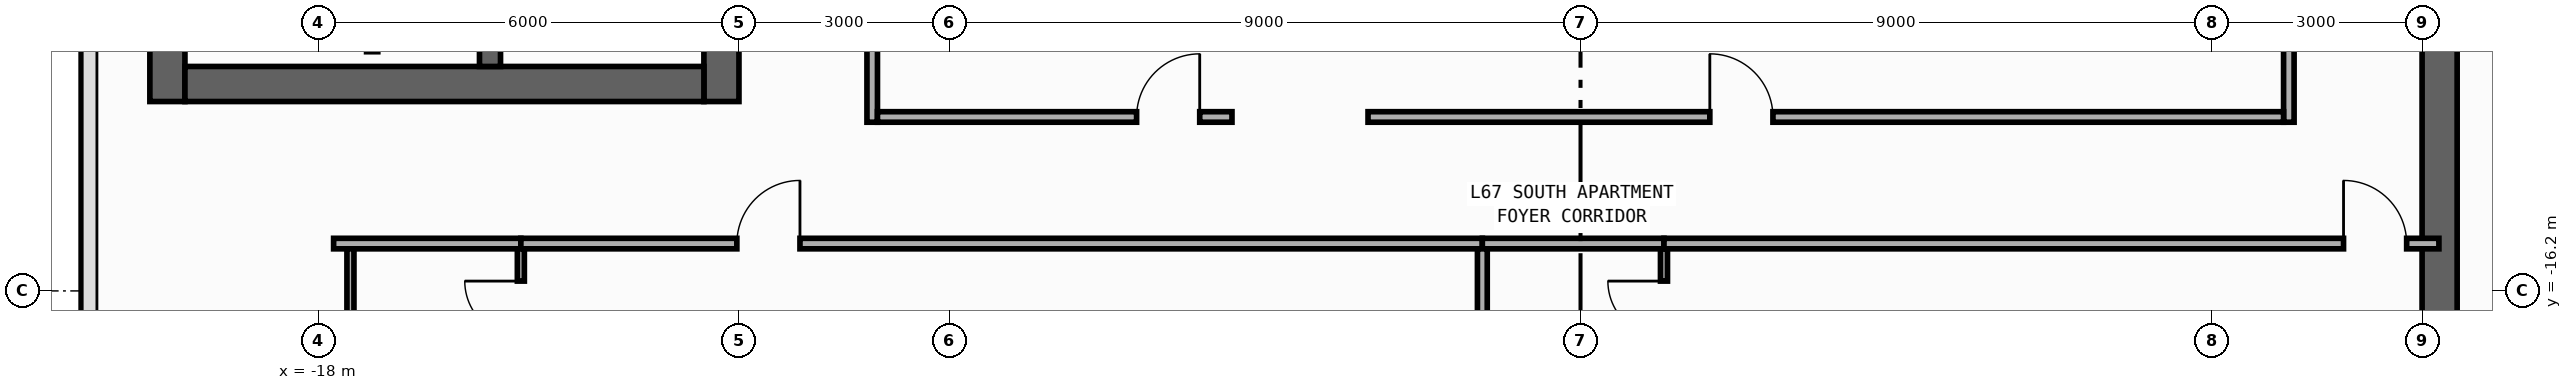
"""IFC4 building model, lengths in metres.
Left out: names, types, materials, properties, quantities, classifications, styles, units other than length and angle.
Written with IfcOpenShell. Run it as: python <this file> out.ifc"""

import sys

from ifc_helpers import new_model, si_unit, direction, frame, frame_2d, origin, place, context, subcontext, project, spatial, rectangle, extrude, element, fill, save


model = new_model("IFC4")
c1 = context("Model", 3, precision=1e-05, world=origin(), true_north=direction((0.0, 1.0)))
c2 = subcontext(c1, "Body", "Model", "MODEL_VIEW")
j1 = project(units=[si_unit("LENGTHUNIT", "METRE"), si_unit("PLANEANGLEUNIT", "RADIAN")], contexts=[c1])
p1 = place(None, origin())
s1 = spatial("IfcSite", under=j1, at=p1, CompositionType="ELEMENT")
p2 = place(p1, origin())
s2 = spatial("IfcBuilding", under=s1, at=p2, CompositionType="ELEMENT")
p3 = place(p2, frame((0.0, 0.0, 281.4)))
s3 = spatial("IfcBuildingStorey", under=s2, at=p3, CompositionType="ELEMENT", Elevation=281.4)
p4 = place(p3, frame((-20.15, -13.5, 0.0), z_axis=(0.0, 0.0, 1.0), x_axis=(0.0, 1.0, 0.0)))
e1 = element("IfcWall", 1, at=p4, inside=s3, PredefinedType="SHEAR", context=c2, shape_type="SweptSolid", body=[
    extrude(rectangle(XDim=27.0, YDim=0.5, at=frame_2d((13.5, 0.0))), origin(), (0.0, 0.0, 1.0), 3.54),
])
p5 = place(p3, frame((-12.25, -13.5, 0.0), z_axis=(0.0, 0.0, 1.0), x_axis=(0.0, 1.0, 0.0)))
e2 = element("IfcWall", 2, at=p5, inside=s3, PredefinedType="SHEAR", context=c2, shape_type="SweptSolid", body=[
    extrude(rectangle(XDim=27.0, YDim=0.5, at=frame_2d((13.5, 0.0))), origin(), (0.0, 0.0, 1.0), 3.54),
])
p6 = place(p5, frame((15.175, 0.0, 0.0)))
e3 = element("IfcOpeningElement", 3, at=p6, cuts=e2, PredefinedType="OPENING", context=c2, shape_type="SweptSolid", body=[
    extrude(rectangle(XDim=0.85, YDim=2.1, at=frame_2d((0.425, 1.05))), frame((0.0, 0.26, 0.0), z_axis=(0.0, -1.0, 0.0), x_axis=(1.0, 0.0, 0.0)), (0.0, 0.0, 1.0), 0.52),
])
p7 = place(p5, frame((21.275, 0.0, 0.0)))
e4 = element("IfcOpeningElement", 4, at=p7, cuts=e2, PredefinedType="OPENING", context=c2, shape_type="SweptSolid", body=[
    extrude(rectangle(XDim=0.85, YDim=2.1, at=frame_2d((0.425, 1.05))), frame((0.0, 0.26, 0.0), z_axis=(0.0, -1.0, 0.0), x_axis=(1.0, 0.0, 0.0)), (0.0, 0.0, 1.0), 0.52),
])
p8 = place(p5, frame((4.275, 0.0, 0.0)))
e5 = element("IfcOpeningElement", 5, at=p8, cuts=e2, PredefinedType="OPENING", context=c2, shape_type="SweptSolid", body=[
    extrude(rectangle(XDim=0.85, YDim=2.1, at=frame_2d((0.425, 1.05))), frame((0.0, 0.26, 0.0), z_axis=(0.0, -1.0, 0.0), x_axis=(1.0, 0.0, 0.0)), (0.0, 0.0, 1.0), 0.52),
])
p9 = place(p5, frame((10.275, 0.0, 0.0)))
e6 = element("IfcOpeningElement", 6, at=p9, cuts=e2, PredefinedType="OPENING", context=c2, shape_type="SweptSolid", body=[
    extrude(rectangle(XDim=0.85, YDim=2.1, at=frame_2d((0.425, 1.05))), frame((0.0, 0.26, 0.0), z_axis=(0.0, -1.0, 0.0), x_axis=(1.0, 0.0, 0.0)), (0.0, 0.0, 1.0), 0.52),
])
p10 = place(p5, frame((12.725, 0.0, 0.0)))
e7 = element("IfcOpeningElement", 7, at=p10, cuts=e2, PredefinedType="OPENING", context=c2, shape_type="SweptSolid", body=[
    extrude(rectangle(XDim=1.15, YDim=2.2, at=frame_2d((0.575, 1.1))), frame((0.0, 0.26, 0.0), z_axis=(0.0, -1.0, 0.0), x_axis=(1.0, 0.0, 0.0)), (0.0, 0.0, 1.0), 0.52),
])
p11 = place(p5, frame((1.625, 0.0, 0.0)))
e8 = element("IfcOpeningElement", 8, at=p11, cuts=e2, PredefinedType="OPENING", context=c2, shape_type="SweptSolid", body=[
    extrude(rectangle(XDim=0.85, YDim=2.1, at=frame_2d((0.425, 1.05))), frame((0.0, 0.26, 0.0), z_axis=(0.0, -1.0, 0.0), x_axis=(1.0, 0.0, 0.0)), (0.0, 0.0, 1.0), 0.52),
])
p12 = place(p3, frame((-19.9, -13.25, 0.0), z_axis=(0.0, 0.0, 1.0), x_axis=(1.0, 0.0, 0.0)))
e9 = element("IfcWall", 9, at=p12, inside=s3, PredefinedType="SHEAR", context=c2, shape_type="SweptSolid", body=[
    extrude(rectangle(XDim=7.4, YDim=0.5, at=frame_2d((3.7, 0.0))), origin(), (0.0, 0.0, 1.0), 3.54),
])
p13 = place(p3, frame((-15.55, -13.0, 0.0), z_axis=(0.0, 0.0, 1.0), x_axis=(0.0, 1.0, 0.0)))
e10 = element("IfcWall", 10, at=p13, inside=s3, PredefinedType="SHEAR", context=c2, shape_type="SweptSolid", body=[
    extrude(rectangle(XDim=26.0, YDim=0.3, at=frame_2d((13.0, 0.0))), origin(), (0.0, 0.0, 1.0), 3.54),
])
p14 = place(p13, frame((12.225, 0.0, 0.0)))
e11 = element("IfcOpeningElement", 11, at=p14, cuts=e10, PredefinedType="OPENING", context=c2, shape_type="SweptSolid", body=[
    extrude(rectangle(XDim=1.15, YDim=2.2, at=frame_2d((0.575, 1.1))), frame((0.0, 0.16, 0.0), z_axis=(0.0, -1.0, 0.0), x_axis=(1.0, 0.0, 0.0)), (0.0, 0.0, 1.0), 0.32),
])
p15 = place(p13, frame((1.125, 0.0, 0.0)))
e12 = element("IfcOpeningElement", 12, at=p15, cuts=e10, PredefinedType="OPENING", context=c2, shape_type="SweptSolid", body=[
    extrude(rectangle(XDim=0.85, YDim=2.1, at=frame_2d((0.425, 1.05))), frame((0.0, 0.16, 0.0), z_axis=(0.0, -1.0, 0.0), x_axis=(1.0, 0.0, 0.0)), (0.0, 0.0, 1.0), 0.32),
])
p16 = place(p3, frame((12.25, -19.8, 0.0), z_axis=(0.0, 0.0, 1.0), x_axis=(0.0, 1.0, 0.0)))
e13 = element("IfcWall", 13, at=p16, inside=s3, PredefinedType="SHEAR", context=c2, shape_type="SweptSolid", body=[
    extrude(rectangle(XDim=27.0, YDim=0.5, at=frame_2d((13.5, 0.0))), origin(), (0.0, 0.0, 1.0), 3.54),
])
p17 = place(p16, frame((23.05, 0.0, 0.0)))
e14 = element("IfcOpeningElement", 14, at=p17, cuts=e13, PredefinedType="OPENING", context=c2, shape_type="SweptSolid", body=[
    extrude(rectangle(XDim=1.1, YDim=2.2, at=frame_2d((0.55, 1.1))), frame((0.0, 0.26, 0.0), z_axis=(0.0, -1.0, 0.0), x_axis=(1.0, 0.0, 0.0)), (0.0, 0.0, 1.0), 0.52),
])
p18 = place(p16, frame((19.85, 0.0, 0.0)))
e15 = element("IfcOpeningElement", 15, at=p18, cuts=e13, PredefinedType="OPENING", context=c2, shape_type="SweptSolid", body=[
    extrude(rectangle(XDim=1.1, YDim=2.2, at=frame_2d((0.55, 1.1))), frame((0.0, 0.26, 0.0), z_axis=(0.0, -1.0, 0.0), x_axis=(1.0, 0.0, 0.0)), (0.0, 0.0, 1.0), 0.52),
])
p19 = place(p16, frame((16.65, 0.0, 0.0)))
e16 = element("IfcOpeningElement", 16, at=p19, cuts=e13, PredefinedType="OPENING", context=c2, shape_type="SweptSolid", body=[
    extrude(rectangle(XDim=1.1, YDim=2.2, at=frame_2d((0.55, 1.1))), frame((0.0, 0.26, 0.0), z_axis=(0.0, -1.0, 0.0), x_axis=(1.0, 0.0, 0.0)), (0.0, 0.0, 1.0), 0.52),
])
p20 = place(p16, frame((10.175, 0.0, 0.0)))
e17 = element("IfcOpeningElement", 17, at=p20, cuts=e13, PredefinedType="OPENING", context=c2, shape_type="SweptSolid", body=[
    extrude(rectangle(XDim=0.85, YDim=2.1, at=frame_2d((0.425, 1.05))), frame((0.0, 0.26, 0.0), z_axis=(0.0, -1.0, 0.0), x_axis=(1.0, 0.0, 0.0)), (0.0, 0.0, 1.0), 0.52),
])
p21 = place(p16, frame((12.725, 0.0, 0.0)))
e18 = element("IfcOpeningElement", 18, at=p21, cuts=e13, PredefinedType="OPENING", context=c2, shape_type="SweptSolid", body=[
    extrude(rectangle(XDim=1.15, YDim=2.2, at=frame_2d((0.575, 1.1))), frame((0.0, 0.26, 0.0), z_axis=(0.0, -1.0, 0.0), x_axis=(1.0, 0.0, 0.0)), (0.0, 0.0, 1.0), 0.52),
])
p22 = place(p16, frame((25.125, 0.0, 0.0)))
e19 = element("IfcOpeningElement", 19, at=p22, cuts=e13, PredefinedType="OPENING", context=c2, shape_type="SweptSolid", body=[
    extrude(rectangle(XDim=0.85, YDim=2.1, at=frame_2d((0.425, 1.05))), frame((0.0, 0.26, 0.0), z_axis=(0.0, -1.0, 0.0), x_axis=(1.0, 0.0, 0.0)), (0.0, 0.0, 1.0), 0.52),
])
p23 = place(p3, frame((-10.1, -13.795, 0.0), z_axis=(0.0, 0.0, 1.0), x_axis=(0.0, 1.0, 0.0)))
e20 = element("IfcWall", 20, at=p23, inside=s3, PredefinedType="PARTITIONING", context=c2, shape_type="SweptSolid", body=[
    extrude(rectangle(XDim=9.005, YDim=0.15, at=frame_2d((4.502, 0.0))), origin(), (0.0, 0.0, 1.0), 3.54),
])
p24 = place(p23, frame((7.645, 0.0, 0.0)))
e21 = element("IfcOpeningElement", 21, at=p24, cuts=e20, PredefinedType="OPENING", context=c2, shape_type="SweptSolid", body=[
    extrude(rectangle(XDim=0.9, YDim=2.15, at=frame_2d((0.45, 1.075))), frame((0.0, 0.085, 0.0), z_axis=(0.0, -1.0, 0.0), x_axis=(1.0, 0.0, 0.0)), (0.0, 0.0, 1.0), 0.17),
])
p25 = place(p3, frame((10.1, -13.795, 0.0), z_axis=(0.0, 0.0, 1.0), x_axis=(0.0, 1.0, 0.0)))
e22 = element("IfcWall", 22, at=p25, inside=s3, PredefinedType="PARTITIONING", context=c2, shape_type="SweptSolid", body=[
    extrude(rectangle(XDim=6.375, YDim=0.15, at=frame_2d((3.188, 0.0))), origin(), (0.0, 0.0, 1.0), 3.54),
])
p26 = place(p25, frame((5.015, 0.0, 0.0)))
e23 = element("IfcOpeningElement", 23, at=p26, cuts=e22, PredefinedType="OPENING", context=c2, shape_type="SweptSolid", body=[
    extrude(rectangle(XDim=0.9, YDim=2.15, at=frame_2d((0.45, 1.075))), frame((0.0, 0.085, 0.0), z_axis=(0.0, -1.0, 0.0), x_axis=(1.0, 0.0, 0.0)), (0.0, 0.0, 1.0), 0.17),
])
p27 = place(p3, frame((-17.78, -15.525, 0.0), z_axis=(0.0, 0.0, 1.0), x_axis=(1.0, 0.0, 0.0)))
e24 = element("IfcWall", 24, at=p27, inside=s3, PredefinedType="PARTITIONING", context=c2, shape_type="SweptSolid", body=[
    extrude(rectangle(XDim=2.67, YDim=0.15, at=frame_2d((1.335, 0.0))), origin(), (0.0, 0.0, 1.0), 3.54),
])
p28 = place(p3, frame((-15.11, -15.525, 0.0), z_axis=(0.0, 0.0, 1.0), x_axis=(1.0, 0.0, 0.0)))
e25 = element("IfcWall", 25, at=p28, inside=s3, PredefinedType="PARTITIONING", context=c2, shape_type="SweptSolid", body=[
    extrude(rectangle(XDim=13.71, YDim=0.15, at=frame_2d((6.855, 0.0))), origin(), (0.0, 0.0, 1.0), 3.54),
])
p29 = place(p28, frame((3.08, 0.0, 0.0)))
e26 = element("IfcOpeningElement", 26, at=p29, cuts=e25, PredefinedType="OPENING", context=c2, shape_type="SweptSolid", body=[
    extrude(rectangle(XDim=0.9, YDim=2.15, at=frame_2d((0.45, 1.075))), frame((0.0, 0.085, 0.0), z_axis=(0.0, -1.0, 0.0), x_axis=(1.0, 0.0, 0.0)), (0.0, 0.0, 1.0), 0.17),
])
p30 = place(p3, frame((-1.4, -15.525, 0.0), z_axis=(0.0, 0.0, 1.0), x_axis=(1.0, 0.0, 0.0)))
e27 = element("IfcWall", 27, at=p30, inside=s3, PredefinedType="PARTITIONING", context=c2, shape_type="SweptSolid", body=[
    extrude(rectangle(XDim=2.59, YDim=0.15, at=frame_2d((1.295, 0.0))), origin(), (0.0, 0.0, 1.0), 3.54),
])
p31 = place(p3, frame((1.19, -15.525, 0.0), z_axis=(0.0, 0.0, 1.0), x_axis=(1.0, 0.0, 0.0)))
e28 = element("IfcWall", 28, at=p31, inside=s3, PredefinedType="PARTITIONING", context=c2, shape_type="SweptSolid", body=[
    extrude(rectangle(XDim=11.05, YDim=0.15, at=frame_2d((5.525, 0.0))), origin(), (0.0, 0.0, 1.0), 3.54),
])
p32 = place(p31, frame((9.69, 0.0, 0.0)))
e29 = element("IfcOpeningElement", 29, at=p32, cuts=e28, PredefinedType="OPENING", context=c2, shape_type="SweptSolid", body=[
    extrude(rectangle(XDim=0.9, YDim=2.15, at=frame_2d((0.45, 1.075))), frame((0.0, 0.085, 0.0), z_axis=(0.0, -1.0, 0.0), x_axis=(1.0, 0.0, 0.0)), (0.0, 0.0, 1.0), 0.17),
])
p33 = place(p3, frame((-10.025, -13.72, 0.0), z_axis=(0.0, 0.0, 1.0), x_axis=(1.0, 0.0, 0.0)))
e30 = element("IfcWall", 30, at=p33, inside=s3, PredefinedType="PARTITIONING", context=c2, shape_type="SweptSolid", body=[
    extrude(rectangle(XDim=5.055, YDim=0.15, at=frame_2d((2.527, 0.0))), origin(), (0.0, 0.0, 1.0), 3.54),
])
p34 = place(p33, frame((3.695, 0.0, 0.0)))
e31 = element("IfcOpeningElement", 31, at=p34, cuts=e30, PredefinedType="OPENING", context=c2, shape_type="SweptSolid", body=[
    extrude(rectangle(XDim=0.9, YDim=2.15, at=frame_2d((0.45, 1.075))), frame((0.0, 0.085, 0.0), z_axis=(0.0, -1.0, 0.0), x_axis=(1.0, 0.0, 0.0)), (0.0, 0.0, 1.0), 0.17),
])
p35 = place(p3, frame((-3.03, -13.72, 0.0), z_axis=(0.0, 0.0, 1.0), x_axis=(1.0, 0.0, 0.0)))
e32 = element("IfcWall", 32, at=p35, inside=s3, PredefinedType="PARTITIONING", context=c2, shape_type="SweptSolid", body=[
    extrude(rectangle(XDim=13.055, YDim=0.15, at=frame_2d((6.527, 0.0))), origin(), (0.0, 0.0, 1.0), 3.54),
])
p36 = place(p35, frame((4.874, 0.0, 0.0)))
e33 = element("IfcOpeningElement", 33, at=p36, cuts=e32, PredefinedType="OPENING", context=c2, shape_type="SweptSolid", body=[
    extrude(rectangle(XDim=0.9, YDim=2.15, at=frame_2d((0.45, 1.075))), frame((0.0, 0.085, 0.0), z_axis=(0.0, -1.0, 0.0), x_axis=(1.0, 0.0, 0.0)), (0.0, 0.0, 1.0), 0.17),
])
p37 = place(p3, frame((-15.11, -18.1, 0.0), z_axis=(0.0, 0.0, 1.0), x_axis=(0.0, 1.0, 0.0)))
e34 = element("IfcWall", 34, at=p37, inside=s3, PredefinedType="PARTITIONING", context=c2, shape_type="SweptSolid", body=[
    extrude(rectangle(XDim=2.5, YDim=0.1, at=frame_2d((1.25, 0.0))), origin(), (0.0, 0.0, 1.0), 3.54),
])
p38 = place(p37, frame((1.24, 0.0, 0.0)))
e35 = element("IfcOpeningElement", 35, at=p38, cuts=e34, PredefinedType="OPENING", context=c2, shape_type="SweptSolid", body=[
    extrude(rectangle(XDim=0.8, YDim=2.1, at=frame_2d((0.4, 1.05))), frame((0.0, 0.06, 0.0), z_axis=(0.0, -1.0, 0.0), x_axis=(1.0, 0.0, 0.0)), (0.0, 0.0, 1.0), 0.12),
])
p39 = place(p3, frame((-1.4, -18.1, 0.0), z_axis=(0.0, 0.0, 1.0), x_axis=(0.0, 1.0, 0.0)))
e36 = element("IfcWall", 36, at=p39, inside=s3, PredefinedType="PARTITIONING", context=c2, shape_type="SweptSolid", body=[
    extrude(rectangle(XDim=2.5, YDim=0.14, at=frame_2d((1.25, 0.0))), origin(), (0.0, 0.0, 1.0), 3.54),
])
p40 = place(p3, frame((1.19, -18.1, 0.0), z_axis=(0.0, 0.0, 1.0), x_axis=(0.0, 1.0, 0.0)))
e37 = element("IfcWall", 37, at=p40, inside=s3, PredefinedType="PARTITIONING", context=c2, shape_type="SweptSolid", body=[
    extrude(rectangle(XDim=2.5, YDim=0.1, at=frame_2d((1.25, 0.0))), origin(), (0.0, 0.0, 1.0), 3.54),
])
p41 = place(p40, frame((1.24, 0.0, 0.0)))
e38 = element("IfcOpeningElement", 38, at=p41, cuts=e37, PredefinedType="OPENING", context=c2, shape_type="SweptSolid", body=[
    extrude(rectangle(XDim=0.8, YDim=2.1, at=frame_2d((0.4, 1.05))), frame((0.0, 0.06, 0.0), z_axis=(0.0, -1.0, 0.0), x_axis=(1.0, 0.0, 0.0)), (0.0, 0.0, 1.0), 0.12),
])
p42 = place(p3, frame((-17.54, -18.05, 0.0), z_axis=(0.0, 0.0, 1.0), x_axis=(0.0, 1.0, 0.0)))
e39 = element("IfcWall", 39, at=p42, inside=s3, PredefinedType="PARTITIONING", context=c2, shape_type="SweptSolid", body=[
    extrude(rectangle(XDim=2.45, YDim=0.1, at=frame_2d((1.225, 0.0))), origin(), (0.0, 0.0, 1.0), 3.54),
])
p43 = place(p29, origin())
e40 = element("IfcDoor", 40, at=p43, inside=s3, OperationType="SINGLE_SWING_RIGHT", PredefinedType="DOOR", context=c2, shape_type="SweptSolid", body=[
    extrude(rectangle(XDim=0.9, YDim=2.15, at=frame_2d((0.45, 1.075))), frame((0.0, 0.025, 0.0), z_axis=(0.0, -1.0, 0.0), x_axis=(1.0, 0.0, 0.0)), (0.0, 0.0, 1.0), 0.05),
])
fill(e26, e40)
p44 = place(p32, origin())
e41 = element("IfcDoor", 41, at=p44, inside=s3, OperationType="SINGLE_SWING_LEFT", PredefinedType="DOOR", context=c2, shape_type="SweptSolid", body=[
    extrude(rectangle(XDim=0.9, YDim=2.15, at=frame_2d((0.45, 1.075))), frame((0.0, 0.025, 0.0), z_axis=(0.0, -1.0, 0.0), x_axis=(1.0, 0.0, 0.0)), (0.0, 0.0, 1.0), 0.05),
])
fill(e29, e41)
p45 = place(p34, origin())
e42 = element("IfcDoor", 42, at=p45, inside=s3, OperationType="SINGLE_SWING_RIGHT", PredefinedType="DOOR", context=c2, shape_type="SweptSolid", body=[
    extrude(rectangle(XDim=0.9, YDim=2.15, at=frame_2d((0.45, 1.075))), frame((0.0, 0.025, 0.0), z_axis=(0.0, -1.0, 0.0), x_axis=(1.0, 0.0, 0.0)), (0.0, 0.0, 1.0), 0.05),
])
fill(e31, e42)
p46 = place(p36, origin())
e43 = element("IfcDoor", 43, at=p46, inside=s3, OperationType="SINGLE_SWING_LEFT", PredefinedType="DOOR", context=c2, shape_type="SweptSolid", body=[
    extrude(rectangle(XDim=0.9, YDim=2.15, at=frame_2d((0.45, 1.075))), frame((0.0, 0.025, 0.0), z_axis=(0.0, -1.0, 0.0), x_axis=(1.0, 0.0, 0.0)), (0.0, 0.0, 1.0), 0.05),
])
fill(e33, e43)
p47 = place(p38, origin())
e44 = element("IfcDoor", 44, at=p47, inside=s3, OperationType="SINGLE_SWING_RIGHT", PredefinedType="DOOR", context=c2, shape_type="SweptSolid", body=[
    extrude(rectangle(XDim=0.8, YDim=2.1, at=frame_2d((0.4, 1.05))), frame((0.0, 0.025, 0.0), z_axis=(0.0, -1.0, 0.0), x_axis=(1.0, 0.0, 0.0)), (0.0, 0.0, 1.0), 0.05),
])
fill(e35, e44)
p48 = place(p41, origin())
e45 = element("IfcDoor", 45, at=p48, inside=s3, OperationType="SINGLE_SWING_RIGHT", PredefinedType="DOOR", context=c2, shape_type="SweptSolid", body=[
    extrude(rectangle(XDim=0.8, YDim=2.1, at=frame_2d((0.4, 1.05))), frame((0.0, 0.025, 0.0), z_axis=(0.0, -1.0, 0.0), x_axis=(1.0, 0.0, 0.0)), (0.0, 0.0, 1.0), 0.05),
])
fill(e38, e45)
save(model, sys.argv[1])
